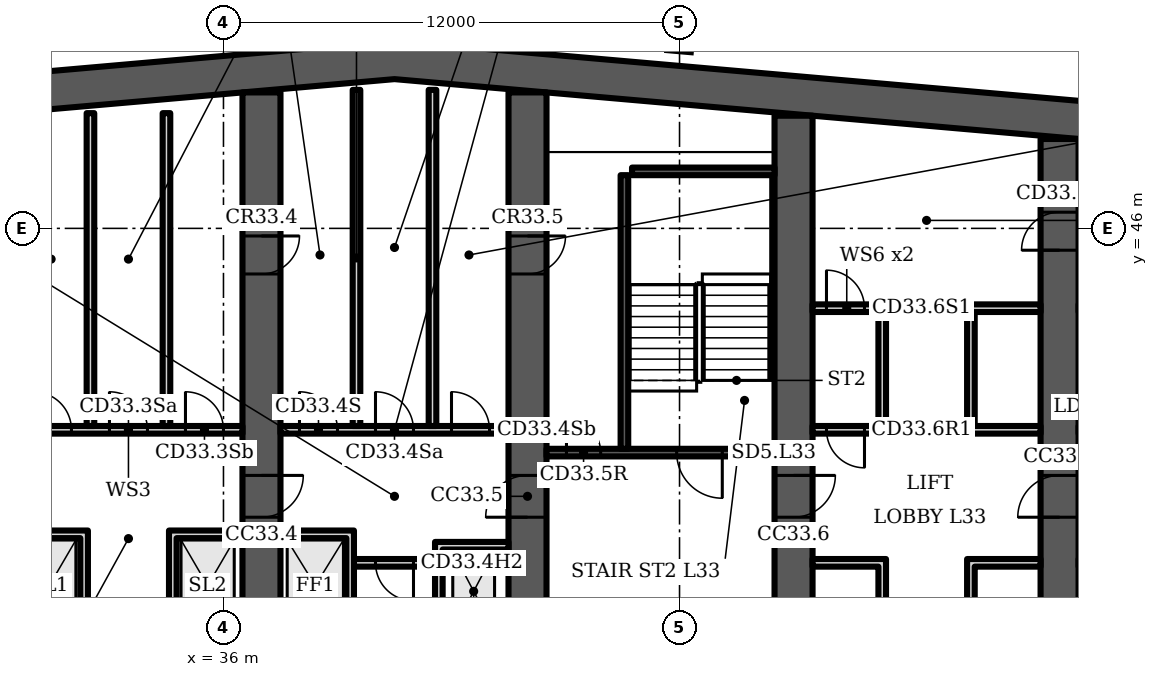
"""IFC4 building model, lengths in metres.
Left out: names, types, materials, properties, quantities, classifications, styles, units other than length and angle.
Written with IfcOpenShell. Run it as: python <this file> out.ifc"""

import sys

from ifc_helpers import new_model, si_unit, direction, frame, frame_2d, origin, origin_2d, place, context, subcontext, project, spatial, polyline, rectangle, i_section, outline, extrude, element, fill, save


model = new_model("IFC4")
c1 = context("Model", 3, precision=1e-05, world=origin(), true_north=direction((0.0, 1.0)))
c2 = subcontext(c1, "Body", "Model", "MODEL_VIEW")
j1 = project(units=[si_unit("LENGTHUNIT", "METRE"), si_unit("PLANEANGLEUNIT", "RADIAN")], contexts=[c1])
p1 = place(None, origin())
s1 = spatial("IfcSite", under=j1, at=p1, CompositionType="ELEMENT")
p2 = place(p1, origin())
s2 = spatial("IfcBuilding", under=s1, at=p2, CompositionType="ELEMENT")
p3 = place(p2, frame((0.0, 0.0, 139.9)))
s3 = spatial("IfcBuildingStorey", under=s2, at=p3, CompositionType="ELEMENT", Elevation=139.9)
p4 = place(p3, origin())
e1 = element("IfcWall", 1, at=p4, inside=s3, PredefinedType="SHEAR", context=c2, shape_type="SweptSolid", body=[
    extrude(outline(polyline([(16.0, 47.784), (40.5, 49.927), (65.0, 47.784), (65.0, 48.787), (40.5, 50.931), (16.0, 48.787), (16.0, 47.784)])), origin(), (0.0, 0.0, 1.0), 3.6),
])
p5 = place(p3, frame((37.0, 35.0, 0.0), z_axis=(0.0, 0.0, 1.0), x_axis=(0.0, 1.0, 0.0)))
e2 = element("IfcWall", 2, at=p5, inside=s3, PredefinedType="SHEAR", context=c2, shape_type="SweptSolid", body=[
    extrude(rectangle(XDim=14.577, YDim=1.0, at=frame_2d((7.289, 0.0))), origin(), (0.0, 0.0, 1.0), 3.6),
])
p6 = place(p5, frame((3.4, 0.0, 0.0)))
e3 = element("IfcOpeningElement", 3, at=p6, cuts=e2, PredefinedType="OPENING", context=c2, shape_type="SweptSolid", body=[
    extrude(rectangle(XDim=1.1, YDim=2.1, at=frame_2d((0.55, 1.05))), frame((0.0, 0.51, 0.0), z_axis=(0.0, -1.0, 0.0), x_axis=(1.0, 0.0, 0.0)), (0.0, 0.0, 1.0), 1.02),
])
p7 = place(p5, frame((9.8, 0.0, 0.0)))
e4 = element("IfcOpeningElement", 4, at=p7, cuts=e2, PredefinedType="OPENING", context=c2, shape_type="SweptSolid", body=[
    extrude(rectangle(XDim=1.0, YDim=2.1, at=frame_2d((0.5, 1.05))), frame((0.0, 0.51, 0.0), z_axis=(0.0, -1.0, 0.0), x_axis=(1.0, 0.0, 0.0)), (0.0, 0.0, 1.0), 1.02),
])
p8 = place(p3, frame((44.0, 35.0, 0.0), z_axis=(0.0, 0.0, 1.0), x_axis=(0.0, 1.0, 0.0)))
e5 = element("IfcWall", 5, at=p8, inside=s3, PredefinedType="SHEAR", context=c2, shape_type="SweptSolid", body=[
    extrude(rectangle(XDim=14.577, YDim=1.0, at=frame_2d((7.289, 0.0))), origin(), (0.0, 0.0, 1.0), 3.6),
])
p9 = place(p8, frame((3.4, 0.0, 0.0)))
e6 = element("IfcOpeningElement", 6, at=p9, cuts=e5, PredefinedType="OPENING", context=c2, shape_type="SweptSolid", body=[
    extrude(rectangle(XDim=1.1, YDim=2.1, at=frame_2d((0.55, 1.05))), frame((0.0, 0.51, 0.0), z_axis=(0.0, -1.0, 0.0), x_axis=(1.0, 0.0, 0.0)), (0.0, 0.0, 1.0), 1.02),
])
p10 = place(p8, frame((9.8, 0.0, 0.0)))
e7 = element("IfcOpeningElement", 7, at=p10, cuts=e5, PredefinedType="OPENING", context=c2, shape_type="SweptSolid", body=[
    extrude(rectangle(XDim=1.0, YDim=2.1, at=frame_2d((0.5, 1.05))), frame((0.0, 0.51, 0.0), z_axis=(0.0, -1.0, 0.0), x_axis=(1.0, 0.0, 0.0)), (0.0, 0.0, 1.0), 1.02),
])
p11 = place(p3, frame((51.0, 35.0, 0.0), z_axis=(0.0, 0.0, 1.0), x_axis=(0.0, 1.0, 0.0)))
e8 = element("IfcWall", 8, at=p11, inside=s3, PredefinedType="SHEAR", context=c2, shape_type="SweptSolid", body=[
    extrude(rectangle(XDim=13.965, YDim=1.0, at=frame_2d((6.982, 0.0))), origin(), (0.0, 0.0, 1.0), 3.6),
])
p12 = place(p11, frame((3.4, 0.0, 0.0)))
e9 = element("IfcOpeningElement", 9, at=p12, cuts=e8, PredefinedType="OPENING", context=c2, shape_type="SweptSolid", body=[
    extrude(rectangle(XDim=1.1, YDim=2.1, at=frame_2d((0.55, 1.05))), frame((0.0, 0.51, 0.0), z_axis=(0.0, -1.0, 0.0), x_axis=(1.0, 0.0, 0.0)), (0.0, 0.0, 1.0), 1.02),
])
p13 = place(p3, frame((58.0, 35.0, 0.0), z_axis=(0.0, 0.0, 1.0), x_axis=(0.0, 1.0, 0.0)))
e10 = element("IfcWall", 10, at=p13, inside=s3, PredefinedType="SHEAR", context=c2, shape_type="SweptSolid", body=[
    extrude(rectangle(XDim=13.352, YDim=1.0, at=frame_2d((6.676, 0.0))), origin(), (0.0, 0.0, 1.0), 3.6),
])
p14 = place(p13, frame((10.426, 0.0, 0.0)))
e11 = element("IfcOpeningElement", 11, at=p14, cuts=e10, PredefinedType="OPENING", context=c2, shape_type="SweptSolid", body=[
    extrude(rectangle(XDim=1.0, YDim=2.1, at=frame_2d((0.5, 1.05))), frame((0.0, 0.51, 0.0), z_axis=(0.0, -1.0, 0.0), x_axis=(1.0, 0.0, 0.0)), (0.0, 0.0, 1.0), 1.02),
])
p15 = place(p13, frame((3.4, 0.0, 0.0)))
e12 = element("IfcOpeningElement", 12, at=p15, cuts=e10, PredefinedType="OPENING", context=c2, shape_type="SweptSolid", body=[
    extrude(rectangle(XDim=1.1, YDim=2.1, at=frame_2d((0.55, 1.05))), frame((0.0, 0.51, 0.0), z_axis=(0.0, -1.0, 0.0), x_axis=(1.0, 0.0, 0.0)), (0.0, 0.0, 1.0), 1.02),
])
p16 = place(p3, frame((48.0, 50.815, 0.0), z_axis=(0.0, 0.0, 1.0), x_axis=(0.087156, 0.996198, 0.0)))
e13 = element("IfcColumn", 13, at=p16, inside=s3, PredefinedType="COLUMN", context=c2, shape_type="SweptSolid", body=[
    extrude(i_section(OverallWidth=0.305, OverallDepth=0.62, WebThickness=0.021, FlangeThickness=0.04, FilletRadius=0.027, at=origin_2d()), origin(), (0.0, 0.0, 1.0), 3.6),
])
p17 = place(p3, frame((30.5, 40.7, 0.0), z_axis=(0.0, 0.0, 1.0), x_axis=(1.0, 0.0, 0.0)))
e14 = element("IfcWall", 14, at=p17, inside=s3, PredefinedType="PARTITIONING", context=c2, shape_type="SweptSolid", body=[
    extrude(rectangle(XDim=6.0, YDim=0.2, at=frame_2d((3.0, 0.0))), origin(), (0.0, 0.0, 1.0), 3.2),
])
p18 = place(p17, frame((0.5, 0.0, 0.0)))
e15 = element("IfcOpeningElement", 15, at=p18, cuts=e14, PredefinedType="OPENING", context=c2, shape_type="SweptSolid", body=[
    extrude(rectangle(XDim=1.0, YDim=2.1, at=frame_2d((0.5, 1.05))), frame((0.0, 0.11, 0.0), z_axis=(0.0, -1.0, 0.0), x_axis=(1.0, 0.0, 0.0)), (0.0, 0.0, 1.0), 0.22),
])
p19 = place(p17, frame((2.5, 0.0, 0.0)))
e16 = element("IfcOpeningElement", 16, at=p19, cuts=e14, PredefinedType="OPENING", context=c2, shape_type="SweptSolid", body=[
    extrude(rectangle(XDim=1.0, YDim=2.1, at=frame_2d((0.5, 1.05))), frame((0.0, 0.11, 0.0), z_axis=(0.0, -1.0, 0.0), x_axis=(1.0, 0.0, 0.0)), (0.0, 0.0, 1.0), 0.22),
])
p20 = place(p17, frame((4.5, 0.0, 0.0)))
e17 = element("IfcOpeningElement", 17, at=p20, cuts=e14, PredefinedType="OPENING", context=c2, shape_type="SweptSolid", body=[
    extrude(rectangle(XDim=1.0, YDim=2.1, at=frame_2d((0.5, 1.05))), frame((0.0, 0.11, 0.0), z_axis=(0.0, -1.0, 0.0), x_axis=(1.0, 0.0, 0.0)), (0.0, 0.0, 1.0), 0.22),
])
p21 = place(p3, origin())
e18 = element("IfcWall", 18, at=p21, inside=s3, PredefinedType="PARTITIONING", context=c2, shape_type="SweptSolid", body=[
    extrude(outline(polyline([(32.233, 37.85), (30.5, 37.85), (30.5, 38.05), (32.233, 38.05), (32.433, 38.05), (32.433, 35.0), (32.233, 35.0), (32.233, 37.85)])), origin(), (0.0, 0.0, 1.0), 3.2),
])
p22 = place(p3, origin())
e19 = element("IfcWall", 19, at=p22, inside=s3, PredefinedType="PARTITIONING", context=c2, shape_type="SweptSolid", body=[
    extrude(outline(polyline([(34.567, 38.05), (34.767, 38.05), (36.5, 38.05), (36.5, 37.85), (34.767, 37.85), (34.767, 35.0), (34.567, 35.0), (34.567, 38.05)])), origin(), (0.0, 0.0, 1.0), 3.2),
])
for number, where, z_axis, x_axis in (
    (20, (32.5, 40.8, 0.0), (0.0, 0.0, 1.0), (0.0, 1.0, 0.0)),
    (21, (34.5, 40.8, 0.0), (0.0, 0.0, 1.0), (0.0, 1.0, 0.0)),
):
    element("IfcWall", number, at=place(p3, frame(where, z_axis=z_axis, x_axis=x_axis)), inside=s3, PredefinedType="PARTITIONING", context=c2, shape_type="SweptSolid", body=[
        extrude(rectangle(XDim=8.232, YDim=0.2, at=frame_2d((4.116, 0.0))), origin(), (0.0, 0.0, 1.0), 3.2),
    ])
p23 = place(p3, frame((39.433, 37.2, 0.0), z_axis=(0.0, 0.0, 1.0), x_axis=(1.0, 0.0, 0.0)))
e22 = element("IfcWall", 22, at=p23, inside=s3, PredefinedType="PARTITIONING", context=c2, shape_type="SweptSolid", body=[
    extrude(rectangle(XDim=2.133, YDim=0.2, at=frame_2d((1.067, 0.0))), origin(), (0.0, 0.0, 1.0), 3.2),
])
p24 = place(p23, frame((0.567, 0.0, 0.0)))
e23 = element("IfcOpeningElement", 23, at=p24, cuts=e22, PredefinedType="OPENING", context=c2, shape_type="SweptSolid", body=[
    extrude(rectangle(XDim=1.0, YDim=2.1, at=frame_2d((0.5, 1.05))), frame((0.0, 0.11, 0.0), z_axis=(0.0, -1.0, 0.0), x_axis=(1.0, 0.0, 0.0)), (0.0, 0.0, 1.0), 0.22),
])
p25 = place(p3, frame((37.5, 40.7, 0.0), z_axis=(0.0, 0.0, 1.0), x_axis=(1.0, 0.0, 0.0)))
e24 = element("IfcWall", 24, at=p25, inside=s3, PredefinedType="PARTITIONING", context=c2, shape_type="SweptSolid", body=[
    extrude(rectangle(XDim=6.0, YDim=0.2, at=frame_2d((3.0, 0.0))), origin(), (0.0, 0.0, 1.0), 3.2),
])
p26 = place(p25, frame((0.5, 0.0, 0.0)))
e25 = element("IfcOpeningElement", 25, at=p26, cuts=e24, PredefinedType="OPENING", context=c2, shape_type="SweptSolid", body=[
    extrude(rectangle(XDim=1.0, YDim=2.1, at=frame_2d((0.5, 1.05))), frame((0.0, 0.11, 0.0), z_axis=(0.0, -1.0, 0.0), x_axis=(1.0, 0.0, 0.0)), (0.0, 0.0, 1.0), 0.22),
])
p27 = place(p25, frame((2.5, 0.0, 0.0)))
e26 = element("IfcOpeningElement", 26, at=p27, cuts=e24, PredefinedType="OPENING", context=c2, shape_type="SweptSolid", body=[
    extrude(rectangle(XDim=1.0, YDim=2.1, at=frame_2d((0.5, 1.05))), frame((0.0, 0.11, 0.0), z_axis=(0.0, -1.0, 0.0), x_axis=(1.0, 0.0, 0.0)), (0.0, 0.0, 1.0), 0.22),
])
p28 = place(p25, frame((4.5, 0.0, 0.0)))
e27 = element("IfcOpeningElement", 27, at=p28, cuts=e24, PredefinedType="OPENING", context=c2, shape_type="SweptSolid", body=[
    extrude(rectangle(XDim=1.0, YDim=2.1, at=frame_2d((0.5, 1.05))), frame((0.0, 0.11, 0.0), z_axis=(0.0, -1.0, 0.0), x_axis=(1.0, 0.0, 0.0)), (0.0, 0.0, 1.0), 0.22),
])
p29 = place(p3, origin())
e28 = element("IfcWall", 28, at=p29, inside=s3, PredefinedType="PARTITIONING", context=c2, shape_type="SweptSolid", body=[
    extrude(outline(polyline([(41.567, 37.75), (41.767, 37.75), (43.5, 37.75), (43.5, 37.55), (41.767, 37.55), (41.767, 35.0), (41.567, 35.0), (41.567, 37.75)])), origin(), (0.0, 0.0, 1.0), 3.2),
])
p30 = place(p3, origin())
e29 = element("IfcWall", 29, at=p30, inside=s3, PredefinedType="PARTITIONING", context=c2, shape_type="SweptSolid", body=[
    extrude(outline(polyline([(39.233, 37.85), (37.5, 37.85), (37.5, 38.05), (39.233, 38.05), (39.433, 38.05), (39.433, 35.0), (39.233, 35.0), (39.233, 37.85)])), origin(), (0.0, 0.0, 1.0), 3.2),
])
for number, where, z_axis, x_axis in (
    (30, (39.5, 40.8, 0.0), (0.0, 0.0, 1.0), (0.0, 1.0, 0.0)),
    (31, (41.5, 40.8, 0.0), (0.0, 0.0, 1.0), (0.0, 1.0, 0.0)),
):
    element("IfcWall", number, at=place(p3, frame(where, z_axis=z_axis, x_axis=x_axis)), inside=s3, PredefinedType="PARTITIONING", context=c2, shape_type="SweptSolid", body=[
        extrude(rectangle(XDim=8.844, YDim=0.2, at=frame_2d((4.422, 0.0))), origin(), (0.0, 0.0, 1.0), 3.2),
    ])
p31 = place(p3, frame((44.5, 40.1, 0.0), z_axis=(0.0, 0.0, 1.0), x_axis=(1.0, 0.0, 0.0)))
e32 = element("IfcWall", 32, at=p31, inside=s3, PredefinedType="SHEAR", context=c2, shape_type="SweptSolid", body=[
    extrude(rectangle(XDim=6.0, YDim=0.2, at=frame_2d((3.0, 0.0))), origin(), (0.0, 0.0, 1.0), 3.2),
])
p32 = place(p31, frame((3.425, 0.0, 0.0)))
e33 = element("IfcOpeningElement", 33, at=p32, cuts=e32, PredefinedType="OPENING", context=c2, shape_type="SweptSolid", body=[
    extrude(rectangle(XDim=1.2, YDim=2.1, at=frame_2d((0.6, 1.05))), frame((0.0, 0.11, 0.0), z_axis=(0.0, -1.0, 0.0), x_axis=(1.0, 0.0, 0.0)), (0.0, 0.0, 1.0), 0.22),
])
p33 = place(p31, frame((0.525, 0.0, 0.0)))
e34 = element("IfcOpeningElement", 34, at=p33, cuts=e32, PredefinedType="OPENING", context=c2, shape_type="SweptSolid", body=[
    extrude(rectangle(XDim=0.9, YDim=2.1, at=frame_2d((0.45, 1.05))), frame((0.0, 0.11, 0.0), z_axis=(0.0, -1.0, 0.0), x_axis=(1.0, 0.0, 0.0)), (0.0, 0.0, 1.0), 0.22),
])
p34 = place(p3, frame((46.55, 40.2, 0.0), z_axis=(0.0, 0.0, 1.0), x_axis=(0.0, 1.0, 0.0)))
e35 = element("IfcWall", 35, at=p34, inside=s3, PredefinedType="SHEAR", context=c2, shape_type="SweptSolid", body=[
    extrude(rectangle(XDim=7.2, YDim=0.2, at=frame_2d((3.6, 0.0))), origin(), (0.0, 0.0, 1.0), 3.2),
])
p35 = place(p3, frame((46.75, 47.5, 0.0), z_axis=(0.0, 0.0, 1.0), x_axis=(1.0, 0.0, 0.0)))
e36 = element("IfcWall", 36, at=p35, inside=s3, PredefinedType="SHEAR", context=c2, shape_type="SweptSolid", body=[
    extrude(rectangle(XDim=3.75, YDim=0.2, at=frame_2d((1.875, 0.0))), origin(), (0.0, 0.0, 1.0), 3.2),
])
p36 = place(p3, frame((51.5, 40.7, 0.0), z_axis=(0.0, 0.0, 1.0), x_axis=(1.0, 0.0, 0.0)))
e37 = element("IfcWall", 37, at=p36, inside=s3, PredefinedType="PARTITIONING", context=c2, shape_type="SweptSolid", body=[
    extrude(rectangle(XDim=6.0, YDim=0.2, at=frame_2d((3.0, 0.0))), origin(), (0.0, 0.0, 1.0), 3.2),
])
p37 = place(p36, frame((0.367, 0.0, 0.0)))
e38 = element("IfcOpeningElement", 38, at=p37, cuts=e37, PredefinedType="OPENING", context=c2, shape_type="SweptSolid", body=[
    extrude(rectangle(XDim=1.0, YDim=2.1, at=frame_2d((0.5, 1.05))), frame((0.0, 0.11, 0.0), z_axis=(0.0, -1.0, 0.0), x_axis=(1.0, 0.0, 0.0)), (0.0, 0.0, 1.0), 0.22),
])
p38 = place(p3, frame((51.5, 43.9, 0.0), z_axis=(0.0, 0.0, 1.0), x_axis=(1.0, 0.0, 0.0)))
e39 = element("IfcWall", 39, at=p38, inside=s3, PredefinedType="PARTITIONING", context=c2, shape_type="SweptSolid", body=[
    extrude(rectangle(XDim=6.0, YDim=0.2, at=frame_2d((3.0, 0.0))), origin(), (0.0, 0.0, 1.0), 3.2),
])
p39 = place(p38, frame((0.367, 0.0, 0.0)))
e40 = element("IfcOpeningElement", 40, at=p39, cuts=e39, PredefinedType="OPENING", context=c2, shape_type="SweptSolid", body=[
    extrude(rectangle(XDim=1.0, YDim=2.1, at=frame_2d((0.5, 1.05))), frame((0.0, 0.11, 0.0), z_axis=(0.0, -1.0, 0.0), x_axis=(1.0, 0.0, 0.0)), (0.0, 0.0, 1.0), 0.22),
])
p40 = place(p3, origin())
e41 = element("IfcWall", 41, at=p40, inside=s3, PredefinedType="PARTITIONING", context=c2, shape_type="SweptSolid", body=[
    extrude(outline(polyline([(53.233, 37.1), (51.5, 37.1), (51.5, 37.3), (53.233, 37.3), (53.433, 37.3), (53.433, 35.0), (53.233, 35.0), (53.233, 37.1)])), origin(), (0.0, 0.0, 1.0), 3.2),
])
p41 = place(p3, origin())
e42 = element("IfcWall", 42, at=p41, inside=s3, PredefinedType="PARTITIONING", context=c2, shape_type="SweptSolid", body=[
    extrude(outline(polyline([(55.567, 37.3), (55.767, 37.3), (57.5, 37.3), (57.5, 37.1), (55.767, 37.1), (55.767, 35.0), (55.567, 35.0), (55.567, 37.3)])), origin(), (0.0, 0.0, 1.0), 3.2),
])
p42 = place(p3, origin())
e43 = element("IfcWall", 43, at=p42, inside=s3, PredefinedType="PARTITIONING", context=c2, shape_type="SweptSolid", body=[
    extrude(outline(polyline([(53.233, 40.8), (53.233, 43.8), (53.433, 43.8), (53.433, 40.8), (53.233, 40.8)])), origin(), (0.0, 0.0, 1.0), 3.2),
])
p43 = place(p3, origin())
e44 = element("IfcWall", 44, at=p43, inside=s3, PredefinedType="PARTITIONING", context=c2, shape_type="SweptSolid", body=[
    extrude(outline(polyline([(55.567, 40.8), (55.567, 43.8), (55.767, 43.8), (55.767, 40.8), (55.567, 40.8)])), origin(), (0.0, 0.0, 1.0), 3.2),
])
p44 = place(p18, origin())
e45 = element("IfcDoor", 45, at=p44, inside=s3, OperationType="SINGLE_SWING_LEFT", PredefinedType="DOOR", context=c2, shape_type="SweptSolid", body=[
    extrude(rectangle(XDim=1.0, YDim=2.1, at=frame_2d((0.5, 1.05))), frame((0.0, 0.025, 0.0), z_axis=(0.0, -1.0, 0.0), x_axis=(1.0, 0.0, 0.0)), (0.0, 0.0, 1.0), 0.05),
])
fill(e15, e45)
p45 = place(p19, origin())
e46 = element("IfcDoor", 46, at=p45, inside=s3, OperationType="SINGLE_SWING_LEFT", PredefinedType="DOOR", context=c2, shape_type="SweptSolid", body=[
    extrude(rectangle(XDim=1.0, YDim=2.1, at=frame_2d((0.5, 1.05))), frame((0.0, 0.025, 0.0), z_axis=(0.0, -1.0, 0.0), x_axis=(1.0, 0.0, 0.0)), (0.0, 0.0, 1.0), 0.05),
])
fill(e16, e46)
p46 = place(p20, origin())
e47 = element("IfcDoor", 47, at=p46, inside=s3, OperationType="SINGLE_SWING_LEFT", PredefinedType="DOOR", context=c2, shape_type="SweptSolid", body=[
    extrude(rectangle(XDim=1.0, YDim=2.1, at=frame_2d((0.5, 1.05))), frame((0.0, 0.025, 0.0), z_axis=(0.0, -1.0, 0.0), x_axis=(1.0, 0.0, 0.0)), (0.0, 0.0, 1.0), 0.05),
])
fill(e17, e47)
p47 = place(p24, origin())
e48 = element("IfcDoor", 48, at=p47, inside=s3, OperationType="SINGLE_SWING_RIGHT", PredefinedType="DOOR", context=c2, shape_type="SweptSolid", body=[
    extrude(rectangle(XDim=1.0, YDim=2.1, at=frame_2d((0.5, 1.05))), frame((0.0, 0.025, 0.0), z_axis=(0.0, -1.0, 0.0), x_axis=(1.0, 0.0, 0.0)), (0.0, 0.0, 1.0), 0.05),
])
fill(e23, e48)
p48 = place(p26, origin())
e49 = element("IfcDoor", 49, at=p48, inside=s3, OperationType="SINGLE_SWING_LEFT", PredefinedType="DOOR", context=c2, shape_type="SweptSolid", body=[
    extrude(rectangle(XDim=1.0, YDim=2.1, at=frame_2d((0.5, 1.05))), frame((0.0, 0.025, 0.0), z_axis=(0.0, -1.0, 0.0), x_axis=(1.0, 0.0, 0.0)), (0.0, 0.0, 1.0), 0.05),
])
fill(e25, e49)
p49 = place(p27, origin())
e50 = element("IfcDoor", 50, at=p49, inside=s3, OperationType="SINGLE_SWING_LEFT", PredefinedType="DOOR", context=c2, shape_type="SweptSolid", body=[
    extrude(rectangle(XDim=1.0, YDim=2.1, at=frame_2d((0.5, 1.05))), frame((0.0, 0.025, 0.0), z_axis=(0.0, -1.0, 0.0), x_axis=(1.0, 0.0, 0.0)), (0.0, 0.0, 1.0), 0.05),
])
fill(e26, e50)
p50 = place(p28, origin())
e51 = element("IfcDoor", 51, at=p50, inside=s3, OperationType="SINGLE_SWING_LEFT", PredefinedType="DOOR", context=c2, shape_type="SweptSolid", body=[
    extrude(rectangle(XDim=1.0, YDim=2.1, at=frame_2d((0.5, 1.05))), frame((0.0, 0.025, 0.0), z_axis=(0.0, -1.0, 0.0), x_axis=(1.0, 0.0, 0.0)), (0.0, 0.0, 1.0), 0.05),
])
fill(e27, e51)
p51 = place(p32, origin())
e52 = element("IfcDoor", 52, at=p51, inside=s3, OperationType="SINGLE_SWING_RIGHT", PredefinedType="DOOR", context=c2, shape_type="SweptSolid", body=[
    extrude(rectangle(XDim=1.2, YDim=2.1, at=frame_2d((0.6, 1.05))), frame((0.0, 0.025, 0.0), z_axis=(0.0, -1.0, 0.0), x_axis=(1.0, 0.0, 0.0)), (0.0, 0.0, 1.0), 0.05),
])
fill(e33, e52)
p52 = place(p33, origin())
e53 = element("IfcDoor", 53, at=p52, inside=s3, OperationType="SINGLE_SWING_LEFT", PredefinedType="DOOR", context=c2, shape_type="SweptSolid", body=[
    extrude(rectangle(XDim=0.9, YDim=2.1, at=frame_2d((0.45, 1.05))), frame((0.0, 0.025, 0.0), z_axis=(0.0, -1.0, 0.0), x_axis=(1.0, 0.0, 0.0)), (0.0, 0.0, 1.0), 0.05),
])
fill(e34, e53)
p53 = place(p37, origin())
e54 = element("IfcDoor", 54, at=p53, inside=s3, OperationType="SINGLE_SWING_RIGHT", PredefinedType="DOOR", context=c2, shape_type="SweptSolid", body=[
    extrude(rectangle(XDim=1.0, YDim=2.1, at=frame_2d((0.5, 1.05))), frame((0.0, 0.025, 0.0), z_axis=(0.0, -1.0, 0.0), x_axis=(1.0, 0.0, 0.0)), (0.0, 0.0, 1.0), 0.05),
])
fill(e38, e54)
p54 = place(p39, origin())
e55 = element("IfcDoor", 55, at=p54, inside=s3, OperationType="SINGLE_SWING_LEFT", PredefinedType="DOOR", context=c2, shape_type="SweptSolid", body=[
    extrude(rectangle(XDim=1.0, YDim=2.1, at=frame_2d((0.5, 1.05))), frame((0.0, 0.025, 0.0), z_axis=(0.0, -1.0, 0.0), x_axis=(1.0, 0.0, 0.0)), (0.0, 0.0, 1.0), 0.05),
])
fill(e40, e55)
p55 = place(p14, origin())
e56 = element("IfcDoor", 56, at=p55, inside=s3, OperationType="SINGLE_SWING_LEFT", PredefinedType="DOOR", context=c2, shape_type="SweptSolid", body=[
    extrude(rectangle(XDim=1.0, YDim=2.1, at=frame_2d((0.5, 1.05))), frame((0.0, 0.5, 0.0), z_axis=(0.0, -1.0, 0.0), x_axis=(1.0, 0.0, 0.0)), (0.0, 0.0, 1.0), 1.0),
])
fill(e11, e56)
p56 = place(p6, origin())
e57 = element("IfcDoor", 57, at=p56, inside=s3, OperationType="SINGLE_SWING_RIGHT", PredefinedType="DOOR", context=c2, shape_type="SweptSolid", body=[
    extrude(rectangle(XDim=1.1, YDim=2.1, at=frame_2d((0.55, 1.05))), frame((0.0, 0.025, 0.0), z_axis=(0.0, -1.0, 0.0), x_axis=(1.0, 0.0, 0.0)), (0.0, 0.0, 1.0), 0.05),
])
fill(e3, e57)
p57 = place(p7, origin())
e58 = element("IfcDoor", 58, at=p57, inside=s3, OperationType="SINGLE_SWING_RIGHT", PredefinedType="DOOR", context=c2, shape_type="SweptSolid", body=[
    extrude(rectangle(XDim=1.0, YDim=2.1, at=frame_2d((0.5, 1.05))), frame((0.0, 0.5, 0.0), z_axis=(0.0, -1.0, 0.0), x_axis=(1.0, 0.0, 0.0)), (0.0, 0.0, 1.0), 1.0),
])
fill(e4, e58)
p58 = place(p9, origin())
e59 = element("IfcDoor", 59, at=p58, inside=s3, OperationType="SINGLE_SWING_LEFT", PredefinedType="DOOR", context=c2, shape_type="SweptSolid", body=[
    extrude(rectangle(XDim=1.1, YDim=2.1, at=frame_2d((0.55, 1.05))), frame((0.0, 0.025, 0.0), z_axis=(0.0, -1.0, 0.0), x_axis=(1.0, 0.0, 0.0)), (0.0, 0.0, 1.0), 0.05),
])
fill(e6, e59)
p59 = place(p10, origin())
e60 = element("IfcDoor", 60, at=p59, inside=s3, OperationType="SINGLE_SWING_RIGHT", PredefinedType="DOOR", context=c2, shape_type="SweptSolid", body=[
    extrude(rectangle(XDim=1.0, YDim=2.1, at=frame_2d((0.5, 1.05))), frame((0.0, 0.5, 0.0), z_axis=(0.0, -1.0, 0.0), x_axis=(1.0, 0.0, 0.0)), (0.0, 0.0, 1.0), 1.0),
])
fill(e7, e60)
p60 = place(p12, origin())
e61 = element("IfcDoor", 61, at=p60, inside=s3, OperationType="SINGLE_SWING_RIGHT", PredefinedType="DOOR", context=c2, shape_type="SweptSolid", body=[
    extrude(rectangle(XDim=1.1, YDim=2.1, at=frame_2d((0.55, 1.05))), frame((0.0, 0.025, 0.0), z_axis=(0.0, -1.0, 0.0), x_axis=(1.0, 0.0, 0.0)), (0.0, 0.0, 1.0), 0.05),
])
fill(e9, e61)
p61 = place(p15, origin())
e62 = element("IfcDoor", 62, at=p61, inside=s3, OperationType="SINGLE_SWING_LEFT", PredefinedType="DOOR", context=c2, shape_type="SweptSolid", body=[
    extrude(rectangle(XDim=1.1, YDim=2.1, at=frame_2d((0.55, 1.05))), frame((0.0, 0.025, 0.0), z_axis=(0.0, -1.0, 0.0), x_axis=(1.0, 0.0, 0.0)), (0.0, 0.0, 1.0), 0.05),
])
fill(e12, e62)
save(model, sys.argv[1])
